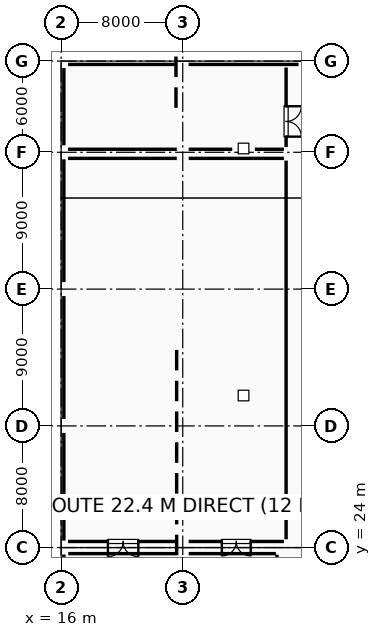
"""IFC4 building model, lengths in metres.
Left out: names, types, materials, properties, quantities, classifications, styles, units other than length and angle.
Written with IfcOpenShell. Run it as: python <this file> out.ifc"""

import sys

from ifc_helpers import new_model, si_unit, direction, frame, frame_2d, origin, origin_2d, place, context, subcontext, project, spatial, rectangle, extrude, element, fill, save


model = new_model("IFC4")
c1 = context("Model", 3, precision=1e-05, world=origin(), true_north=direction((0.0, 1.0)))
c2 = subcontext(c1, "Body", "Model", "MODEL_VIEW")
j1 = project(units=[si_unit("LENGTHUNIT", "METRE"), si_unit("PLANEANGLEUNIT", "RADIAN")], contexts=[c1])
p1 = place(None, origin())
s1 = spatial("IfcSite", under=j1, at=p1, CompositionType="ELEMENT")
p2 = place(p1, origin())
s2 = spatial("IfcBuilding", under=s1, at=p2, CompositionType="ELEMENT")
p3 = place(p2, frame((0.0, 0.0, 10.2)))
s3 = spatial("IfcBuildingStorey", under=s2, at=p3, CompositionType="ELEMENT", Elevation=10.2)
for number, where, z_axis, x_axis in (
    (1, (16.0, 24.0, 0.0), (0.0, 0.0, 1.0), (1.0, 0.0, 0.0)),
    (2, (16.0, 32.0, 0.0), (0.0, 0.0, 1.0), (1.0, 0.0, 0.0)),
    (3, (16.0, 41.0, 0.0), (0.0, 0.0, 1.0), (1.0, 0.0, 0.0)),
    (4, (16.0, 50.0, 0.0), (0.0, 0.0, 1.0), (1.0, 0.0, 0.0)),
    (5, (16.0, 56.0, 0.0), (0.0, 0.0, 1.0), (1.0, 0.0, 0.0)),
):
    element("IfcColumn", number, at=place(p3, frame(where, z_axis=z_axis, x_axis=x_axis)), inside=s3, PredefinedType="COLUMN", context=c2, shape_type="SweptSolid", body=[
        extrude(rectangle(XDim=0.9, YDim=0.9, at=origin_2d()), origin(), (0.0, 0.0, 1.0), 4.8),
    ])
for number, where, z_axis, x_axis in (
    (6, (24.0, 24.0, 0.0), (0.0, 0.0, 1.0), (1.0, 0.0, 0.0)),
    (7, (24.0, 50.0, 0.0), (0.0, 0.0, 1.0), (1.0, 0.0, 0.0)),
    (8, (24.0, 56.0, 0.0), (0.0, 0.0, 1.0), (1.0, 0.0, 0.0)),
    (9, (32.0, 24.0, 0.0), (0.0, 0.0, 1.0), (1.0, 0.0, 0.0)),
    (10, (32.0, 50.0, 0.0), (0.0, 0.0, 1.0), (1.0, 0.0, 0.0)),
    (11, (32.0, 56.0, 0.0), (0.0, 0.0, 1.0), (1.0, 0.0, 0.0)),
):
    element("IfcColumn", number, at=place(p3, frame(where, z_axis=z_axis, x_axis=x_axis)), inside=s3, PredefinedType="COLUMN", context=c2, shape_type="SweptSolid", body=[
        extrude(rectangle(XDim=0.75, YDim=0.75, at=origin_2d()), origin(), (0.0, 0.0, 1.0), 4.8),
    ])
p4 = place(p3, frame((16.18, 21.204, 0.0), z_axis=(0.0, 0.0, 1.0), x_axis=(0.0, 1.0, 0.0)))
e12 = element("IfcWall", 12, at=p4, inside=s3, PredefinedType="STANDARD", context=c2, shape_type="SweptSolid", body=[
    extrude(rectangle(XDim=2.338, YDim=0.32, at=frame_2d((1.169, 0.0))), origin(), (0.0, 0.0, 1.0), 4.225),
])
p5 = place(p3, frame((16.18, 24.458, 0.0), z_axis=(0.0, 0.0, 1.0), x_axis=(0.0, 1.0, 0.0)))
e13 = element("IfcWall", 13, at=p5, inside=s3, PredefinedType="STANDARD", context=c2, shape_type="SweptSolid", body=[
    extrude(rectangle(XDim=7.084, YDim=0.32, at=frame_2d((3.542, 0.0))), origin(), (0.0, 0.0, 1.0), 3.925),
])
p6 = place(p5, frame((2.342, 0.0, 0.95)))
e14 = element("IfcOpeningElement", 14, at=p6, cuts=e13, PredefinedType="OPENING", context=c2, shape_type="SweptSolid", body=[
    extrude(rectangle(XDim=2.4, YDim=2.1, at=frame_2d((1.2, 1.05))), frame((0.0, 0.17, 0.0), z_axis=(0.0, -1.0, 0.0), x_axis=(1.0, 0.0, 0.0)), (0.0, 0.0, 1.0), 0.34),
])
p7 = place(p3, frame((16.18, 32.458, 0.0), z_axis=(0.0, 0.0, 1.0), x_axis=(0.0, 1.0, 0.0)))
e15 = element("IfcWall", 15, at=p7, inside=s3, PredefinedType="STANDARD", context=c2, shape_type="SweptSolid", body=[
    extrude(rectangle(XDim=8.084, YDim=0.32, at=frame_2d((4.042, 0.0))), origin(), (0.0, 0.0, 1.0), 3.975),
])
p8 = place(p7, frame((3.592, 0.0, 0.95)))
e16 = element("IfcOpeningElement", 16, at=p8, cuts=e15, PredefinedType="OPENING", context=c2, shape_type="SweptSolid", body=[
    extrude(rectangle(XDim=0.9, YDim=1.2, at=frame_2d((0.45, 0.6))), frame((0.0, 0.17, 0.0), z_axis=(0.0, -1.0, 0.0), x_axis=(1.0, 0.0, 0.0)), (0.0, 0.0, 1.0), 0.34),
])
p9 = place(p3, frame((16.18, 41.458, 0.0), z_axis=(0.0, 0.0, 1.0), x_axis=(0.0, 1.0, 0.0)))
e17 = element("IfcWall", 17, at=p9, inside=s3, PredefinedType="STANDARD", context=c2, shape_type="SweptSolid", body=[
    extrude(rectangle(XDim=8.084, YDim=0.32, at=frame_2d((4.042, 0.0))), origin(), (0.0, 0.0, 1.0), 4.025),
])
p10 = place(p9, frame((3.592, 0.0, 0.95)))
e18 = element("IfcOpeningElement", 18, at=p10, cuts=e17, PredefinedType="OPENING", context=c2, shape_type="SweptSolid", body=[
    extrude(rectangle(XDim=0.9, YDim=1.5, at=frame_2d((0.45, 0.75))), frame((0.0, 0.17, 0.0), z_axis=(0.0, -1.0, 0.0), x_axis=(1.0, 0.0, 0.0)), (0.0, 0.0, 1.0), 0.34),
])
p11 = place(p3, frame((16.18, 50.458, 0.0), z_axis=(0.0, 0.0, 1.0), x_axis=(0.0, 1.0, 0.0)))
e19 = element("IfcWall", 19, at=p11, inside=s3, PredefinedType="STANDARD", context=c2, shape_type="SweptSolid", body=[
    extrude(rectangle(XDim=5.084, YDim=0.32, at=frame_2d((2.542, 0.0))), origin(), (0.0, 0.0, 1.0), 4.075),
])
p12 = place(p11, frame((2.092, 0.0, 0.95)))
e20 = element("IfcOpeningElement", 20, at=p12, cuts=e19, PredefinedType="OPENING", context=c2, shape_type="SweptSolid", body=[
    extrude(rectangle(XDim=0.9, YDim=1.8, at=frame_2d((0.45, 0.9))), frame((0.0, 0.17, 0.0), z_axis=(0.0, -1.0, 0.0), x_axis=(1.0, 0.0, 0.0)), (0.0, 0.0, 1.0), 0.34),
])
p13 = place(p3, frame((16.458, 55.78, 0.0), z_axis=(0.0, 0.0, 1.0), x_axis=(1.0, 0.0, 0.0)))
e21 = element("IfcWall", 21, at=p13, inside=s3, PredefinedType="STANDARD", context=c2, shape_type="SweptSolid", body=[
    extrude(rectangle(XDim=7.159, YDim=0.4, at=frame_2d((3.58, 0.0))), origin(), (0.0, 0.0, 1.0), 4.075),
])
p14 = place(p13, frame((3.13, 0.0, 0.95)))
e22 = element("IfcOpeningElement", 22, at=p14, cuts=e21, PredefinedType="OPENING", context=c2, shape_type="SweptSolid", body=[
    extrude(rectangle(XDim=0.9, YDim=2.1, at=frame_2d((0.45, 1.05))), frame((0.0, 0.21, 0.0), z_axis=(0.0, -1.0, 0.0), x_axis=(1.0, 0.0, 0.0)), (0.0, 0.0, 1.0), 0.42),
])
p15 = place(p3, frame((24.383, 55.78, 0.0), z_axis=(0.0, 0.0, 1.0), x_axis=(1.0, 0.0, 0.0)))
e23 = element("IfcWall", 23, at=p15, inside=s3, PredefinedType="STANDARD", context=c2, shape_type="SweptSolid", body=[
    extrude(rectangle(XDim=7.234, YDim=0.4, at=frame_2d((3.617, 0.0))), origin(), (0.0, 0.0, 1.0), 3.925),
])
p16 = place(p15, frame((3.067, 0.0, 0.95)))
e24 = element("IfcOpeningElement", 24, at=p16, cuts=e23, PredefinedType="OPENING", context=c2, shape_type="SweptSolid", body=[
    extrude(rectangle(XDim=1.1, YDim=1.2, at=frame_2d((0.55, 0.6))), frame((0.0, 0.21, 0.0), z_axis=(0.0, -1.0, 0.0), x_axis=(1.0, 0.0, 0.0)), (0.0, 0.0, 1.0), 0.42),
])
p17 = place(p3, frame((16.454, 49.6, 0.0), z_axis=(0.0, 0.0, 1.0), x_axis=(1.0, 0.0, 0.0)))
e25 = element("IfcWall", 25, at=p17, inside=s3, PredefinedType="PARTITIONING", context=c2, shape_type="SweptSolid", body=[
    extrude(rectangle(XDim=7.156, YDim=0.25, at=frame_2d((3.578, 0.0))), origin(), (0.0, 0.0, 1.0), 4.53),
])
p18 = place(p3, frame((24.39, 49.6, 0.0), z_axis=(0.0, 0.0, 1.0), x_axis=(1.0, 0.0, 0.0)))
e26 = element("IfcWall", 26, at=p18, inside=s3, PredefinedType="PARTITIONING", context=c2, shape_type="SweptSolid", body=[
    extrude(rectangle(XDim=6.265, YDim=0.25, at=frame_2d((3.133, 0.0))), origin(), (0.0, 0.0, 1.0), 4.53),
])
p19 = place(p3, frame((30.8, 49.455, 0.0), z_axis=(0.0, 0.0, 1.0), x_axis=(0.0, -1.0, 0.0)))
e27 = element("IfcWall", 27, at=p19, inside=s3, PredefinedType="PARTITIONING", context=c2, shape_type="SweptSolid", body=[
    extrude(rectangle(XDim=24.91, YDim=0.25, at=frame_2d((12.455, 0.0))), origin(), (0.0, 0.0, 1.0), 4.53),
])
p20 = place(p3, frame((30.655, 24.4, 0.0), z_axis=(0.0, 0.0, 1.0), x_axis=(-1.0, 0.0, 0.0)))
e28 = element("IfcWall", 28, at=p20, inside=s3, PredefinedType="PARTITIONING", context=c2, shape_type="SweptSolid", body=[
    extrude(rectangle(XDim=6.265, YDim=0.25, at=frame_2d((3.133, 0.0))), origin(), (0.0, 0.0, 1.0), 4.53),
])
p21 = place(p20, frame((2.183, 0.0, 0.0)))
e29 = element("IfcOpeningElement", 29, at=p21, cuts=e28, PredefinedType="OPENING", context=c2, shape_type="SweptSolid", body=[
    extrude(rectangle(XDim=1.9, YDim=2.35, at=frame_2d((0.95, 1.175))), frame((0.0, 0.135, 0.0), z_axis=(0.0, -1.0, 0.0), x_axis=(1.0, 0.0, 0.0)), (0.0, 0.0, 1.0), 0.27),
])
p22 = place(p3, frame((23.61, 24.4, 0.0), z_axis=(0.0, 0.0, 1.0), x_axis=(-1.0, 0.0, 0.0)))
e30 = element("IfcWall", 30, at=p22, inside=s3, PredefinedType="PARTITIONING", context=c2, shape_type="SweptSolid", body=[
    extrude(rectangle(XDim=7.156, YDim=0.25, at=frame_2d((3.578, 0.0))), origin(), (0.0, 0.0, 1.0), 4.53),
])
p23 = place(p22, frame((2.532, 0.0, 0.0)))
e31 = element("IfcOpeningElement", 31, at=p23, cuts=e30, PredefinedType="OPENING", context=c2, shape_type="SweptSolid", body=[
    extrude(rectangle(XDim=2.0, YDim=2.35, at=frame_2d((1.0, 1.175))), frame((0.0, 0.135, 0.0), z_axis=(0.0, -1.0, 0.0), x_axis=(1.0, 0.0, 0.0)), (0.0, 0.0, 1.0), 0.27),
])
p24 = place(p3, frame((30.8, 55.576, 0.0), z_axis=(0.0, 0.0, 1.0), x_axis=(0.0, -1.0, 0.0)))
e32 = element("IfcWall", 32, at=p24, inside=s3, PredefinedType="PARTITIONING", context=c2, shape_type="SweptSolid", body=[
    extrude(rectangle(XDim=5.231, YDim=0.25, at=frame_2d((2.615, 0.0))), origin(), (0.0, 0.0, 1.0), 4.53),
])
p25 = place(p24, frame((2.547, 0.0, 0.0)))
e33 = element("IfcOpeningElement", 33, at=p25, cuts=e32, PredefinedType="OPENING", context=c2, shape_type="SweptSolid", body=[
    extrude(rectangle(XDim=2.0, YDim=2.35, at=frame_2d((1.0, 1.175))), frame((0.0, 0.135, 0.0), z_axis=(0.0, -1.0, 0.0), x_axis=(1.0, 0.0, 0.0)), (0.0, 0.0, 1.0), 0.27),
])
p26 = place(p3, frame((30.655, 50.2, 0.0), z_axis=(0.0, 0.0, 1.0), x_axis=(-1.0, 0.0, 0.0)))
e34 = element("IfcWall", 34, at=p26, inside=s3, PredefinedType="PARTITIONING", context=c2, shape_type="SweptSolid", body=[
    extrude(rectangle(XDim=1.91, YDim=0.25, at=frame_2d((0.955, 0.0))), origin(), (0.0, 0.0, 1.0), 4.07),
])
p27 = place(p3, frame((27.255, 50.2, 0.0), z_axis=(0.0, 0.0, 1.0), x_axis=(-1.0, 0.0, 0.0)))
e35 = element("IfcWall", 35, at=p27, inside=s3, PredefinedType="PARTITIONING", context=c2, shape_type="SweptSolid", body=[
    extrude(rectangle(XDim=2.865, YDim=0.25, at=frame_2d((1.433, 0.0))), origin(), (0.0, 0.0, 1.0), 4.07),
])
p28 = place(p3, frame((23.61, 50.2, 0.0), z_axis=(0.0, 0.0, 1.0), x_axis=(-1.0, 0.0, 0.0)))
e36 = element("IfcWall", 36, at=p28, inside=s3, PredefinedType="PARTITIONING", context=c2, shape_type="SweptSolid", body=[
    extrude(rectangle(XDim=7.156, YDim=0.25, at=frame_2d((3.578, 0.0))), origin(), (0.0, 0.0, 1.0), 4.02),
])
p29 = place(p3, frame((30.2, 23.53, 0.0), z_axis=(0.0, 0.0, 1.0), x_axis=(0.0, -1.0, 0.0)))
e37 = element("IfcWall", 37, at=p29, inside=s3, PredefinedType="PARTITIONING", context=c2, shape_type="SweptSolid", body=[
    extrude(rectangle(XDim=15.226, YDim=0.1, at=frame_2d((7.613, 0.0))), origin(), (0.0, 0.0, 1.0), 4.53),
])
p30 = place(p29, frame((12.049, 0.0, 0.0)))
e38 = element("IfcOpeningElement", 38, at=p30, cuts=e37, PredefinedType="OPENING", context=c2, shape_type="SweptSolid", body=[
    extrude(rectangle(XDim=1.05, YDim=2.15, at=frame_2d((0.525, 1.075))), frame((0.0, 0.06, 0.0), z_axis=(0.0, -1.0, 0.0), x_axis=(1.0, 0.0, 0.0)), (0.0, 0.0, 1.0), 0.12),
])
p31 = place(p3, frame((16.47, 23.6, 0.0), z_axis=(0.0, 0.0, 1.0), x_axis=(1.0, 0.0, 0.0)))
e39 = element("IfcWall", 39, at=p31, inside=s3, PredefinedType="PARTITIONING", context=c2, shape_type="SweptSolid", body=[
    extrude(rectangle(XDim=7.14, YDim=0.1, at=frame_2d((3.57, 0.0))), origin(), (0.0, 0.0, 1.0), 4.57),
])
p32 = place(p3, frame((24.39, 23.6, 0.0), z_axis=(0.0, 0.0, 1.0), x_axis=(1.0, 0.0, 0.0)))
e40 = element("IfcWall", 40, at=p32, inside=s3, PredefinedType="PARTITIONING", context=c2, shape_type="SweptSolid", body=[
    extrude(rectangle(XDim=5.74, YDim=0.1, at=frame_2d((2.87, 0.0))), origin(), (0.0, 0.0, 1.0), 4.53),
])
p33 = place(p6, origin())
e41 = element("IfcWindow", 41, at=p33, inside=s3, PartitioningType="SINGLE_PANEL", PredefinedType="SKYLIGHT", context=c2, shape_type="SweptSolid", body=[
    extrude(rectangle(XDim=2.4, YDim=2.1, at=frame_2d((1.2, 1.05))), frame((0.0, 0.03, 0.0), z_axis=(0.0, -1.0, 0.0), x_axis=(1.0, 0.0, 0.0)), (0.0, 0.0, 1.0), 0.06),
])
fill(e14, e41)
p34 = place(p8, origin())
e42 = element("IfcWindow", 42, at=p34, inside=s3, PartitioningType="SINGLE_PANEL", PredefinedType="WINDOW", context=c2, shape_type="SweptSolid", body=[
    extrude(rectangle(XDim=0.9, YDim=1.2, at=frame_2d((0.45, 0.6))), frame((0.0, 0.03, 0.0), z_axis=(0.0, -1.0, 0.0), x_axis=(1.0, 0.0, 0.0)), (0.0, 0.0, 1.0), 0.06),
])
fill(e16, e42)
p35 = place(p10, origin())
e43 = element("IfcWindow", 43, at=p35, inside=s3, PartitioningType="SINGLE_PANEL", PredefinedType="WINDOW", context=c2, shape_type="SweptSolid", body=[
    extrude(rectangle(XDim=0.9, YDim=1.5, at=frame_2d((0.45, 0.75))), frame((0.0, 0.03, 0.0), z_axis=(0.0, -1.0, 0.0), x_axis=(1.0, 0.0, 0.0)), (0.0, 0.0, 1.0), 0.06),
])
fill(e18, e43)
p36 = place(p12, origin())
e44 = element("IfcWindow", 44, at=p36, inside=s3, PartitioningType="SINGLE_PANEL", PredefinedType="WINDOW", context=c2, shape_type="SweptSolid", body=[
    extrude(rectangle(XDim=0.9, YDim=1.8, at=frame_2d((0.45, 0.9))), frame((0.0, 0.03, 0.0), z_axis=(0.0, -1.0, 0.0), x_axis=(1.0, 0.0, 0.0)), (0.0, 0.0, 1.0), 0.06),
])
fill(e20, e44)
p37 = place(p14, origin())
e45 = element("IfcWindow", 45, at=p37, inside=s3, PartitioningType="SINGLE_PANEL", PredefinedType="WINDOW", context=c2, shape_type="SweptSolid", body=[
    extrude(rectangle(XDim=0.9, YDim=2.1, at=frame_2d((0.45, 1.05))), frame((0.0, 0.03, 0.0), z_axis=(0.0, -1.0, 0.0), x_axis=(1.0, 0.0, 0.0)), (0.0, 0.0, 1.0), 0.06),
])
fill(e22, e45)
p38 = place(p16, origin())
e46 = element("IfcWindow", 46, at=p38, inside=s3, PartitioningType="SINGLE_PANEL", PredefinedType="WINDOW", context=c2, shape_type="SweptSolid", body=[
    extrude(rectangle(XDim=1.1, YDim=1.2, at=frame_2d((0.55, 0.6))), frame((0.0, 0.03, 0.0), z_axis=(0.0, -1.0, 0.0), x_axis=(1.0, 0.0, 0.0)), (0.0, 0.0, 1.0), 0.06),
])
fill(e24, e46)
p39 = place(p23, origin())
e47 = element("IfcDoor", 47, at=p39, inside=s3, OperationType="DOUBLE_SWING_LEFT", PredefinedType="DOOR", context=c2, shape_type="SweptSolid", body=[
    extrude(rectangle(XDim=2.0, YDim=2.35, at=frame_2d((1.0, 1.175))), frame((0.0, 0.025, 0.0), z_axis=(0.0, -1.0, 0.0), x_axis=(1.0, 0.0, 0.0)), (0.0, 0.0, 1.0), 0.05),
])
fill(e31, e47)
p40 = place(p21, origin())
e48 = element("IfcDoor", 48, at=p40, inside=s3, OperationType="DOUBLE_SWING_RIGHT", PredefinedType="DOOR", context=c2, shape_type="SweptSolid", body=[
    extrude(rectangle(XDim=1.9, YDim=2.35, at=frame_2d((0.95, 1.175))), frame((0.0, 0.025, 0.0), z_axis=(0.0, -1.0, 0.0), x_axis=(1.0, 0.0, 0.0)), (0.0, 0.0, 1.0), 0.05),
])
fill(e29, e48)
p41 = place(p25, origin())
e49 = element("IfcDoor", 49, at=p41, inside=s3, OperationType="DOUBLE_SWING_LEFT", PredefinedType="DOOR", context=c2, shape_type="SweptSolid", body=[
    extrude(rectangle(XDim=2.0, YDim=2.35, at=frame_2d((1.0, 1.175))), frame((0.0, 0.025, 0.0), z_axis=(0.0, -1.0, 0.0), x_axis=(1.0, 0.0, 0.0)), (0.0, 0.0, 1.0), 0.05),
])
fill(e33, e49)
save(model, sys.argv[1])
